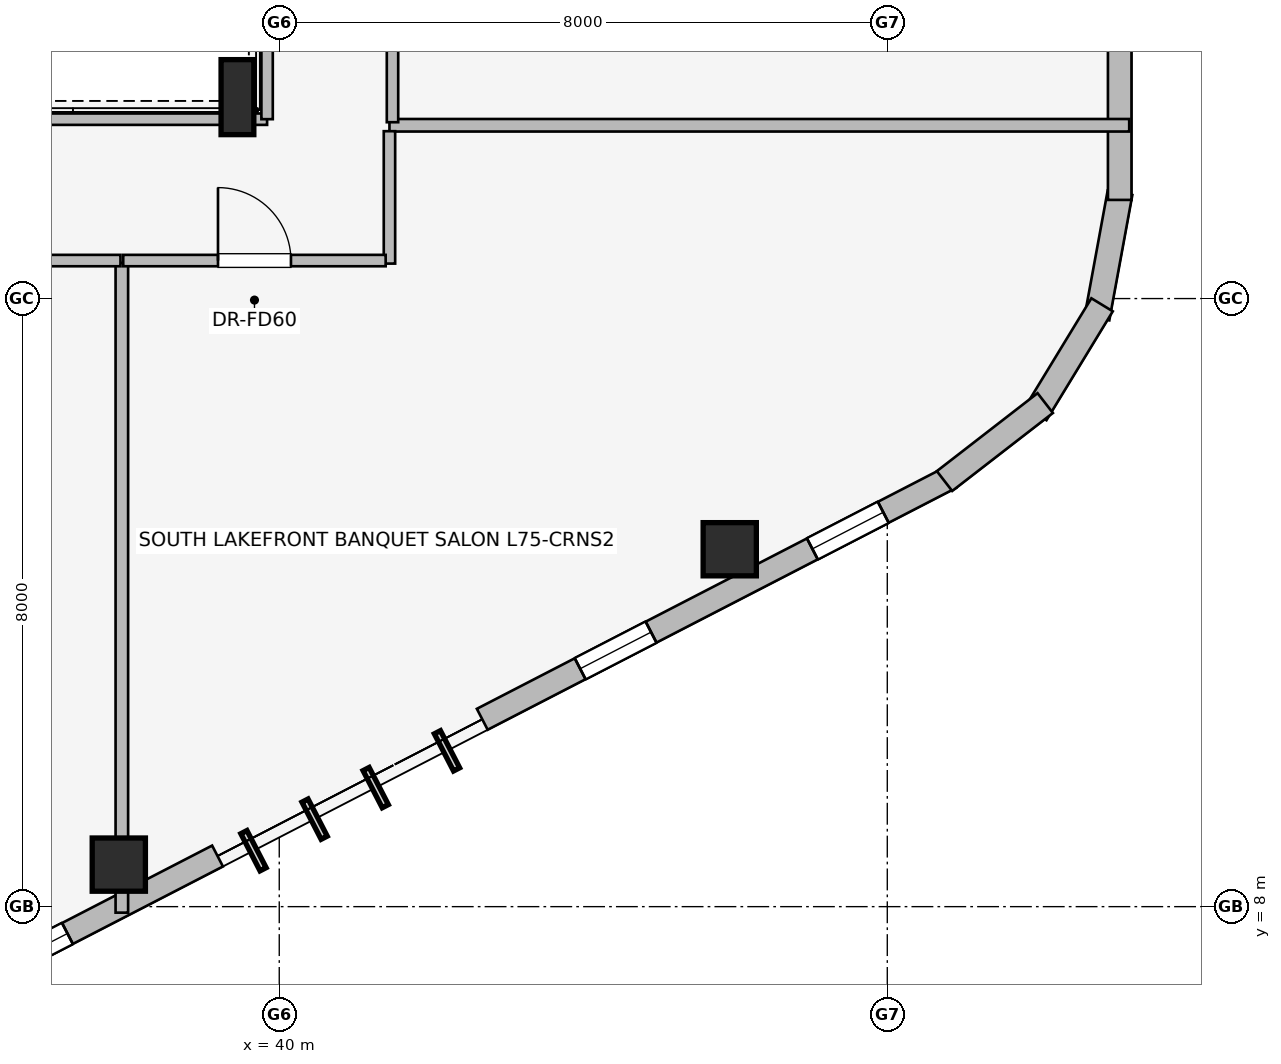
"""IFC4 building model, lengths in metres.
Left out: names, types, materials, properties, quantities, classifications, styles, units other than length and angle.
Written with IfcOpenShell. Run it as: python <this file> out.ifc"""

import sys

from ifc_helpers import new_model, si_unit, direction, frame, frame_2d, origin, origin_2d, place, context, subcontext, project, spatial, rectangle, i_section, extrude, element, fill, save


model = new_model("IFC4")
c1 = context("Model", 3, precision=1e-05, world=origin(), true_north=direction((0.0, 1.0)))
c2 = subcontext(c1, "Body", "Model", "MODEL_VIEW")
j1 = project(units=[si_unit("LENGTHUNIT", "METRE"), si_unit("PLANEANGLEUNIT", "RADIAN")], contexts=[c1])
p1 = place(None, origin())
s1 = spatial("IfcSite", under=j1, at=p1, CompositionType="ELEMENT")
p2 = place(p1, origin())
s2 = spatial("IfcBuilding", under=s1, at=p2, CompositionType="ELEMENT")
p3 = place(p2, frame((0.0, 0.0, 275.1)))
s3 = spatial("IfcBuildingStorey", under=s2, at=p3, CompositionType="ELEMENT", Elevation=275.1)
for number, where, z_axis, x_axis in (
    (1, (37.889, 8.553, 0.0), (0.0, 0.0, 1.0), (1.0, 0.0, 0.0)),
    (2, (45.927, 12.702, 0.0), (0.0, 0.0, 1.0), (1.0, 0.0, 0.0)),
):
    element("IfcColumn", number, at=place(p3, frame(where, z_axis=z_axis, x_axis=x_axis)), inside=s3, PredefinedType="COLUMN", context=c2, shape_type="SweptSolid", body=[
        extrude(rectangle(XDim=0.7, YDim=0.7, at=origin_2d()), origin(), (0.0, 0.0, 1.0), 4.8),
    ])
p4 = place(p3, frame((39.45, 18.65, 0.0), z_axis=(0.0, 0.0, 1.0), x_axis=(1.0, 0.0, 0.0)))
e3 = element("IfcColumn", 3, at=p4, inside=s3, PredefinedType="COLUMN", context=c2, shape_type="SweptSolid", body=[
    extrude(i_section(OverallWidth=0.431, OverallDepth=0.987, WebThickness=0.034, FlangeThickness=0.062, at=origin_2d()), origin(), (0.0, 0.0, 1.0), 4.8),
])
p5 = place(p3, frame((48.834, 13.646, 0.0), z_axis=(0.0, 0.0, 1.0), x_axis=(-0.888622971019, -0.458638436437, 0.0)))
e4 = element("IfcWall", 4, at=p5, inside=s3, PredefinedType="STANDARD", context=c2, shape_type="SweptSolid", body=[
    extrude(rectangle(XDim=6.936, YDim=0.31, at=frame_2d((3.468, 0.0))), origin(), (0.0, 0.0, 1.0), 4.49),
])
p6 = place(p5, frame((0.998, 0.0, 0.75)))
e5 = element("IfcOpeningElement", 5, at=p6, cuts=e4, PredefinedType="OPENING", context=c2, shape_type="SweptSolid", body=[
    extrude(rectangle(XDim=1.05, YDim=1.4, at=frame_2d((0.525, 0.7))), frame((0.0, 0.165, 0.0), z_axis=(0.0, -1.0, 0.0), x_axis=(1.0, 0.0, 0.0)), (0.0, 0.0, 1.0), 0.33),
])
p7 = place(p5, frame((4.436, 0.0, 0.75)))
e6 = element("IfcOpeningElement", 6, at=p7, cuts=e4, PredefinedType="OPENING", context=c2, shape_type="SweptSolid", body=[
    extrude(rectangle(XDim=1.05, YDim=1.4, at=frame_2d((0.525, 0.7))), frame((0.0, 0.165, 0.0), z_axis=(0.0, -1.0, 0.0), x_axis=(1.0, 0.0, 0.0)), (0.0, 0.0, 1.0), 0.33),
])
p8 = place(p3, frame((39.188, 8.666, 0.0), z_axis=(0.0, 0.0, 1.0), x_axis=(-0.888616094641, -0.45865175934, 0.0)))
e7 = element("IfcWall", 7, at=p8, inside=s3, PredefinedType="STANDARD", context=c2, shape_type="SweptSolid", body=[
    extrude(rectangle(XDim=4.221, YDim=0.31, at=frame_2d((2.111, 0.0))), origin(), (0.0, 0.0, 1.0), 4.49),
])
p9 = place(p8, frame((2.222, 0.0, 0.75)))
e8 = element("IfcOpeningElement", 8, at=p9, cuts=e7, PredefinedType="OPENING", context=c2, shape_type="SweptSolid", body=[
    extrude(rectangle(XDim=1.05, YDim=1.4, at=frame_2d((0.525, 0.7))), frame((0.0, 0.165, 0.0), z_axis=(0.0, -1.0, 0.0), x_axis=(1.0, 0.0, 0.0)), (0.0, 0.0, 1.0), 0.33),
])
p10 = place(p3, frame((51.062, 17.392, 0.0), z_axis=(0.0, 0.0, 1.0), x_axis=(-0.180691763044, -0.983539773862, 0.0)))
e9 = element("IfcWall", 9, at=p10, inside=s3, PredefinedType="STANDARD", context=c2, shape_type="SweptSolid", body=[
    extrude(rectangle(XDim=1.677, YDim=0.33, at=frame_2d((0.838, 0.0))), origin(), (0.0, 0.0, 1.0), 4.49),
])
p11 = place(p3, frame((50.826, 15.918, 0.0), z_axis=(0.0, 0.0, 1.0), x_axis=(-0.520325409202, -0.853968072318, 0.0)))
e10 = element("IfcWall", 10, at=p11, inside=s3, PredefinedType="STANDARD", context=c2, shape_type="SweptSolid", body=[
    extrude(rectangle(XDim=1.678, YDim=0.33, at=frame_2d((0.839, 0.0))), origin(), (0.0, 0.0, 1.0), 4.49),
])
p12 = place(p3, frame((50.078, 14.625, 0.0), z_axis=(0.0, 0.0, 1.0), x_axis=(-0.790691856293, -0.61221433207, 0.0)))
e11 = element("IfcWall", 11, at=p12, inside=s3, PredefinedType="STANDARD", context=c2, shape_type="SweptSolid", body=[
    extrude(rectangle(XDim=1.676, YDim=0.33, at=frame_2d((0.838, 0.0))), origin(), (0.0, 0.0, 1.0), 4.49),
])
p13 = place(p3, frame((51.058, 21.051, 0.0), z_axis=(0.0, 0.0, 1.0), x_axis=(0.0, -1.0, 0.0)))
e12 = element("IfcWall", 12, at=p13, inside=s3, PredefinedType="STANDARD", context=c2, shape_type="SweptSolid", body=[
    extrude(rectangle(XDim=3.753, YDim=0.31, at=frame_2d((1.876, 0.0))), origin(), (0.0, 0.0, 1.0), 4.49),
])
p14 = place(p3, frame((27.675, 18.36, 0.0), z_axis=(0.0, 0.0, 1.0), x_axis=(1.0, 0.0, 0.0)))
e13 = element("IfcWall", 13, at=p14, inside=s3, PredefinedType="PARTITIONING", context=c2, shape_type="SweptSolid", body=[
    extrude(rectangle(XDim=12.165, YDim=0.15, at=frame_2d((6.083, 0.0))), origin(), (0.0, 0.0, 1.0), 3.631),
])
p15 = place(p3, frame((39.84, 18.36, 0.0), z_axis=(0.0, 0.0, 1.0), x_axis=(0.0, 1.0, 0.0)))
e14 = element("IfcWall", 14, at=p15, inside=s3, PredefinedType="PARTITIONING", context=c2, shape_type="SweptSolid", body=[
    extrude(rectangle(XDim=11.28, YDim=0.15, at=frame_2d((5.64, 0.0))), origin(), (0.0, 0.0, 1.0), 4.49),
])
p16 = place(p3, frame((41.45, 18.28, 0.0), z_axis=(0.0, 0.0, 1.0), x_axis=(1.0, 0.0, 0.0)))
e15 = element("IfcWall", 15, at=p16, inside=s3, PredefinedType="PARTITIONING", context=c2, shape_type="SweptSolid", body=[
    extrude(rectangle(XDim=9.733, YDim=0.165, at=frame_2d((4.867, 0.0))), origin(), (0.0, 0.0, 1.0), 4.49),
])
p17 = place(p3, frame((41.49, 18.32, 0.0), z_axis=(0.0, 0.0, 1.0), x_axis=(0.0, 1.0, 0.0)))
e16 = element("IfcWall", 16, at=p17, inside=s3, PredefinedType="PARTITIONING", context=c2, shape_type="SweptSolid", body=[
    extrude(rectangle(XDim=5.435, YDim=0.15, at=frame_2d((2.717, 0.0))), origin(), (0.0, 0.0, 1.0), 4.49),
])
p18 = place(p17, frame((2.238, 0.0, 0.0)))
e17 = element("IfcOpeningElement", 17, at=p18, cuts=e16, PredefinedType="OPENING", context=c2, shape_type="SweptSolid", body=[
    extrude(rectangle(XDim=0.96, YDim=2.0, at=frame_2d((0.48, 1.0))), frame((0.0, 0.085, 0.0), z_axis=(0.0, -1.0, 0.0), x_axis=(1.0, 0.0, 0.0)), (0.0, 0.0, 1.0), 0.17),
])
p19 = place(p3, frame((41.45, 16.46, 0.0), z_axis=(0.0, 0.0, 1.0), x_axis=(0.0, 1.0, 0.0)))
e18 = element("IfcWall", 18, at=p19, inside=s3, PredefinedType="PARTITIONING", context=c2, shape_type="SweptSolid", body=[
    extrude(rectangle(XDim=1.742, YDim=0.15, at=frame_2d((0.871, 0.0))), origin(), (0.0, 0.0, 1.0), 4.49),
])
p20 = place(p3, frame((37.929, 7.921, 0.0), z_axis=(0.0, 0.0, 1.0), x_axis=(0.0, 1.0, 0.0)))
e19 = element("IfcWall", 19, at=p20, inside=s3, PredefinedType="PARTITIONING", context=c2, shape_type="SweptSolid", body=[
    extrude(rectangle(XDim=8.549, YDim=0.165, at=frame_2d((4.274, 0.0))), origin(), (0.0, 0.0, 1.0), 3.879),
])
p21 = place(p3, frame((32.85, 16.5, 0.0), z_axis=(0.0, 0.0, 1.0), x_axis=(1.0, 0.0, 0.0)))
e20 = element("IfcWall", 20, at=p21, inside=s3, PredefinedType="PARTITIONING", context=c2, shape_type="SweptSolid", body=[
    extrude(rectangle(XDim=5.061, YDim=0.15, at=frame_2d((2.53, 0.0))), origin(), (0.0, 0.0, 1.0), 4.49),
])
p22 = place(p21, frame((2.051, 0.0, 0.0)))
e21 = element("IfcOpeningElement", 21, at=p22, cuts=e20, PredefinedType="OPENING", context=c2, shape_type="SweptSolid", body=[
    extrude(rectangle(XDim=0.96, YDim=2.0, at=frame_2d((0.48, 1.0))), frame((0.0, 0.085, 0.0), z_axis=(0.0, -1.0, 0.0), x_axis=(1.0, 0.0, 0.0)), (0.0, 0.0, 1.0), 0.17),
])
p23 = place(p3, frame((37.947, 16.5, 0.0), z_axis=(0.0, 0.0, 1.0), x_axis=(1.0, 0.0, 0.0)))
e22 = element("IfcWall", 22, at=p23, inside=s3, PredefinedType="PARTITIONING", context=c2, shape_type="SweptSolid", body=[
    extrude(rectangle(XDim=3.453, YDim=0.15, at=frame_2d((1.727, 0.0))), origin(), (0.0, 0.0, 1.0), 4.49),
])
p24 = place(p23, frame((1.247, 0.0, 0.0)))
e23 = element("IfcOpeningElement", 23, at=p24, cuts=e22, PredefinedType="OPENING", context=c2, shape_type="SweptSolid", body=[
    extrude(rectangle(XDim=0.96, YDim=2.0, at=frame_2d((0.48, 1.0))), frame((0.0, 0.085, 0.0), z_axis=(0.0, -1.0, 0.0), x_axis=(1.0, 0.0, 0.0)), (0.0, 0.0, 1.0), 0.17),
])
p25 = place(p6, origin())
e24 = element("IfcWindow", 24, at=p25, inside=s3, PartitioningType="SINGLE_PANEL", PredefinedType="WINDOW", context=c2, shape_type="SweptSolid", body=[
    extrude(rectangle(XDim=1.05, YDim=1.4, at=frame_2d((0.525, 0.7))), frame((0.0, 0.03, 0.0), z_axis=(0.0, -1.0, 0.0), x_axis=(1.0, 0.0, 0.0)), (0.0, 0.0, 1.0), 0.06),
])
fill(e5, e24)
p26 = place(p7, origin())
e25 = element("IfcWindow", 25, at=p26, inside=s3, PartitioningType="SINGLE_PANEL", PredefinedType="WINDOW", context=c2, shape_type="SweptSolid", body=[
    extrude(rectangle(XDim=1.05, YDim=1.4, at=frame_2d((0.525, 0.7))), frame((0.0, 0.03, 0.0), z_axis=(0.0, -1.0, 0.0), x_axis=(1.0, 0.0, 0.0)), (0.0, 0.0, 1.0), 0.06),
])
fill(e6, e25)
p27 = place(p9, origin())
e26 = element("IfcWindow", 26, at=p27, inside=s3, PartitioningType="SINGLE_PANEL", PredefinedType="WINDOW", context=c2, shape_type="SweptSolid", body=[
    extrude(rectangle(XDim=1.05, YDim=1.4, at=frame_2d((0.525, 0.7))), frame((0.0, 0.03, 0.0), z_axis=(0.0, -1.0, 0.0), x_axis=(1.0, 0.0, 0.0)), (0.0, 0.0, 1.0), 0.06),
])
fill(e8, e26)
p28 = place(p24, origin())
e27 = element("IfcDoor", 27, at=p28, inside=s3, OperationType="SINGLE_SWING_LEFT", PredefinedType="DOOR", context=c2, shape_type="SweptSolid", body=[
    extrude(rectangle(XDim=0.96, YDim=2.0, at=frame_2d((0.48, 1.0))), frame((0.0, 0.025, 0.0), z_axis=(0.0, -1.0, 0.0), x_axis=(1.0, 0.0, 0.0)), (0.0, 0.0, 1.0), 0.05),
])
fill(e23, e27)
save(model, sys.argv[1])
